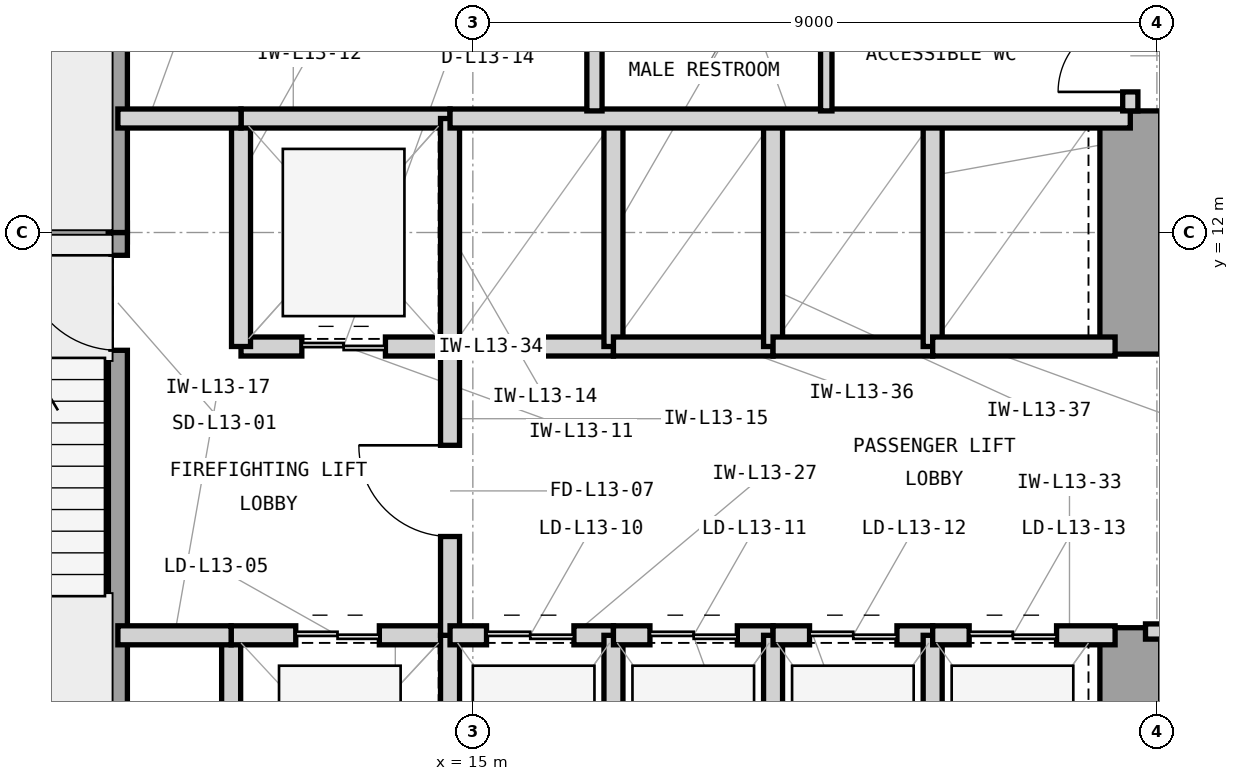
"""IFC4 building model, lengths in metres.
Left out: names, types, materials, properties, quantities, classifications, styles, units other than length and angle.
Written with IfcOpenShell. Run it as: python <this file> out.ifc"""

import sys

from ifc_helpers import new_model, si_unit, direction, frame, frame_2d, origin, place, context, subcontext, project, spatial, rectangle, extrude, element, fill, save


model = new_model("IFC4")
c1 = context("Model", 3, precision=1e-05, world=origin(), true_north=direction((0.0, 1.0)))
c2 = subcontext(c1, "Body", "Model", "MODEL_VIEW")
j1 = project(units=[si_unit("LENGTHUNIT", "METRE"), si_unit("PLANEANGLEUNIT", "RADIAN")], contexts=[c1])
p1 = place(None, origin())
s1 = spatial("IfcSite", under=j1, at=p1, CompositionType="ELEMENT")
p2 = place(p1, origin())
s2 = spatial("IfcBuilding", under=s1, at=p2, CompositionType="ELEMENT")
p3 = place(p2, frame((0.0, 0.0, 59.4)))
s3 = spatial("IfcBuildingStorey", under=s2, at=p3, CompositionType="ELEMENT", Elevation=59.4)
p4 = place(p3, frame((23.65, 3.75, 0.0), z_axis=(0.0, 0.0, 1.0), x_axis=(0.0, 1.0, 0.0)))
e1 = element("IfcWall", 1, at=p4, inside=s3, PredefinedType="SHEAR", context=c2, shape_type="SweptSolid", body=[
    extrude(rectangle(XDim=3.05, YDim=0.8, at=frame_2d((1.525, 0.0))), origin(), (0.0, 0.0, 1.0), 4.2),
])
p5 = place(p3, frame((23.65, 10.4, 0.0), z_axis=(0.0, 0.0, 1.0), x_axis=(0.0, 1.0, 0.0)))
e2 = element("IfcWall", 2, at=p5, inside=s3, PredefinedType="SHEAR", context=c2, shape_type="SweptSolid", body=[
    extrude(rectangle(XDim=3.2, YDim=0.8, at=frame_2d((1.6, 0.0))), origin(), (0.0, 0.0, 1.0), 4.2),
])
p6 = place(p3, frame((6.35, 12.0, 0.0), z_axis=(0.0, 0.0, 1.0), x_axis=(1.0, 0.0, 0.0)))
e3 = element("IfcWall", 3, at=p6, inside=s3, PredefinedType="SHEAR", context=c2, shape_type="SweptSolid", body=[
    extrude(rectangle(XDim=4.105, YDim=0.25, at=frame_2d((2.052, 0.0))), origin(), (0.0, 0.0, 1.0), 4.2),
])
p7 = place(p3, frame((10.33, 4.55, 0.0), z_axis=(0.0, 0.0, 1.0), x_axis=(0.0, 1.0, 0.0)))
e4 = element("IfcWall", 4, at=p7, inside=s3, PredefinedType="SHEAR", context=c2, shape_type="SweptSolid", body=[
    extrude(rectangle(XDim=7.45, YDim=0.25, at=frame_2d((3.725, 0.0))), origin(), (0.0, 0.0, 1.0), 4.2),
])
p8 = place(p7, frame((5.9, 0.0, 0.0)))
e5 = element("IfcOpeningElement", 5, at=p8, cuts=e4, PredefinedType="OPENING", context=c2, shape_type="SweptSolid", body=[
    extrude(rectangle(XDim=1.25, YDim=2.2, at=frame_2d((0.625, 1.1))), frame((0.0, 0.135, 0.0), z_axis=(0.0, -1.0, 0.0), x_axis=(1.0, 0.0, 0.0)), (0.0, 0.0, 1.0), 0.27),
])
p9 = place(p3, frame((10.33, 12.0, 0.0), z_axis=(0.0, 0.0, 1.0), x_axis=(0.0, 1.0, 0.0)))
e6 = element("IfcWall", 6, at=p9, inside=s3, PredefinedType="SHEAR", context=c2, shape_type="SweptSolid", body=[
    extrude(rectangle(XDim=7.45, YDim=0.25, at=frame_2d((3.725, 0.0))), origin(), (0.0, 0.0, 1.0), 4.2),
])
p10 = place(p9, frame((5.85, 0.0, 0.0)))
e7 = element("IfcOpeningElement", 7, at=p10, cuts=e6, PredefinedType="OPENING", context=c2, shape_type="SweptSolid", body=[
    extrude(rectangle(XDim=1.25, YDim=2.2, at=frame_2d((0.625, 1.1))), frame((0.0, 0.135, 0.0), z_axis=(0.0, -1.0, 0.0), x_axis=(1.0, 0.0, 0.0)), (0.0, 0.0, 1.0), 0.27),
])
p11 = place(p3, frame((11.82, 3.35, 0.0), z_axis=(0.0, 0.0, 1.0), x_axis=(0.0, 1.0, 0.0)))
e8 = element("IfcWall", 8, at=p11, inside=s3, PredefinedType="PARTITIONING", context=c2, shape_type="SweptSolid", body=[
    extrude(rectangle(XDim=3.35, YDim=0.25, at=frame_2d((1.675, 0.0))), origin(), (0.0, 0.0, 1.0), 3.97),
])
p12 = place(p3, frame((11.82, 6.7, 0.0), z_axis=(0.0, 0.0, 1.0), x_axis=(1.0, 0.0, 0.0)))
e9 = element("IfcWall", 9, at=p12, inside=s3, PredefinedType="PARTITIONING", context=c2, shape_type="SweptSolid", body=[
    extrude(rectangle(XDim=2.88, YDim=0.25, at=frame_2d((1.44, 0.0))), origin(), (0.0, 0.0, 1.0), 3.426),
])
p13 = place(p12, frame((0.85, 0.0, 0.0)))
e10 = element("IfcOpeningElement", 10, at=p13, cuts=e9, PredefinedType="OPENING", context=c2, shape_type="SweptSolid", body=[
    extrude(rectangle(XDim=1.1, YDim=2.25, at=frame_2d((0.55, 1.125))), frame((0.0, 0.135, 0.0), z_axis=(0.0, -1.0, 0.0), x_axis=(1.0, 0.0, 0.0)), (0.0, 0.0, 1.0), 0.27),
])
p14 = place(p3, frame((14.7, 3.35, 0.0), z_axis=(0.0, 0.0, 1.0), x_axis=(0.0, 1.0, 0.0)))
e11 = element("IfcWall", 11, at=p14, inside=s3, PredefinedType="PARTITIONING", context=c2, shape_type="SweptSolid", body=[
    extrude(rectangle(XDim=3.35, YDim=0.25, at=frame_2d((1.675, 0.0))), origin(), (0.0, 0.0, 1.0), 3.97),
])
p15 = place(p3, frame((11.95, 10.5, 0.0), z_axis=(0.0, 0.0, 1.0), x_axis=(1.0, 0.0, 0.0)))
e12 = element("IfcWall", 12, at=p15, inside=s3, PredefinedType="PARTITIONING", context=c2, shape_type="SweptSolid", body=[
    extrude(rectangle(XDim=2.75, YDim=0.25, at=frame_2d((1.375, 0.0))), origin(), (0.0, 0.0, 1.0), 3.426),
])
p16 = place(p15, frame((0.8, 0.0, 0.0)))
e13 = element("IfcOpeningElement", 13, at=p16, cuts=e12, PredefinedType="OPENING", context=c2, shape_type="SweptSolid", body=[
    extrude(rectangle(XDim=1.1, YDim=2.25, at=frame_2d((0.55, 1.125))), frame((0.0, 0.135, 0.0), z_axis=(0.0, -1.0, 0.0), x_axis=(1.0, 0.0, 0.0)), (0.0, 0.0, 1.0), 0.27),
])
p17 = place(p3, frame((11.95, 10.5, 0.0), z_axis=(0.0, 0.0, 1.0), x_axis=(0.0, 1.0, 0.0)))
e14 = element("IfcWall", 14, at=p17, inside=s3, PredefinedType="PARTITIONING", context=c2, shape_type="SweptSolid", body=[
    extrude(rectangle(XDim=3.0, YDim=0.25, at=frame_2d((1.5, 0.0))), origin(), (0.0, 0.0, 1.0), 3.97),
])
p18 = place(p3, frame((11.95, 13.5, 0.0), z_axis=(0.0, 0.0, 1.0), x_axis=(1.0, 0.0, 0.0)))
e15 = element("IfcWall", 15, at=p18, inside=s3, PredefinedType="PARTITIONING", context=c2, shape_type="SweptSolid", body=[
    extrude(rectangle(XDim=2.75, YDim=0.25, at=frame_2d((1.375, 0.0))), origin(), (0.0, 0.0, 1.0), 3.426),
])
p19 = place(p3, frame((14.7, 10.5, 0.0), z_axis=(0.0, 0.0, 1.0), x_axis=(0.0, 1.0, 0.0)))
e16 = element("IfcWall", 16, at=p19, inside=s3, PredefinedType="PARTITIONING", context=c2, shape_type="SweptSolid", body=[
    extrude(rectangle(XDim=3.0, YDim=0.25, at=frame_2d((1.5, 0.0))), origin(), (0.0, 0.0, 1.0), 3.97),
])
p20 = place(p3, frame((14.7, 6.7, 0.0), z_axis=(0.0, 0.0, 1.0), x_axis=(0.0, 1.0, 0.0)))
e17 = element("IfcWall", 17, at=p20, inside=s3, PredefinedType="PARTITIONING", context=c2, shape_type="SweptSolid", body=[
    extrude(rectangle(XDim=3.8, YDim=0.25, at=frame_2d((1.9, 0.0))), origin(), (0.0, 0.0, 1.0), 3.97),
])
p21 = place(p20, frame((1.3, 0.0, 0.0)))
e18 = element("IfcOpeningElement", 18, at=p21, cuts=e17, PredefinedType="OPENING", context=c2, shape_type="SweptSolid", body=[
    extrude(rectangle(XDim=1.2, YDim=2.2, at=frame_2d((0.6, 1.1))), frame((0.0, 0.135, 0.0), z_axis=(0.0, -1.0, 0.0), x_axis=(1.0, 0.0, 0.0)), (0.0, 0.0, 1.0), 0.27),
])
p22 = place(p3, frame((10.33, 13.5, 0.0), z_axis=(0.0, 0.0, 1.0), x_axis=(1.0, 0.0, 0.0)))
e19 = element("IfcWall", 19, at=p22, inside=s3, PredefinedType="PARTITIONING", context=c2, shape_type="SweptSolid", body=[
    extrude(rectangle(XDim=1.62, YDim=0.25, at=frame_2d((0.81, 0.0))), origin(), (0.0, 0.0, 1.0), 3.426),
])
p23 = place(p3, frame((10.33, 6.7, 0.0), z_axis=(0.0, 0.0, 1.0), x_axis=(1.0, 0.0, 0.0)))
e20 = element("IfcWall", 20, at=p23, inside=s3, PredefinedType="PARTITIONING", context=c2, shape_type="SweptSolid", body=[
    extrude(rectangle(XDim=1.49, YDim=0.25, at=frame_2d((0.745, 0.0))), origin(), (0.0, 0.0, 1.0), 3.426),
])
p24 = place(p3, frame((14.7, 6.7, 0.0), z_axis=(0.0, 0.0, 1.0), x_axis=(1.0, 0.0, 0.0)))
e21 = element("IfcWall", 21, at=p24, inside=s3, PredefinedType="PARTITIONING", context=c2, shape_type="SweptSolid", body=[
    extrude(rectangle(XDim=2.15, YDim=0.25, at=frame_2d((1.075, 0.0))), origin(), (0.0, 0.0, 1.0), 3.426),
])
p25 = place(p24, frame((0.48, 0.0, 0.0)))
e22 = element("IfcOpeningElement", 22, at=p25, cuts=e21, PredefinedType="OPENING", context=c2, shape_type="SweptSolid", body=[
    extrude(rectangle(XDim=1.15, YDim=2.25, at=frame_2d((0.575, 1.125))), frame((0.0, 0.135, 0.0), z_axis=(0.0, -1.0, 0.0), x_axis=(1.0, 0.0, 0.0)), (0.0, 0.0, 1.0), 0.27),
])
p26 = place(p3, frame((16.85, 3.35, 0.0), z_axis=(0.0, 0.0, 1.0), x_axis=(0.0, 1.0, 0.0)))
e23 = element("IfcWall", 23, at=p26, inside=s3, PredefinedType="PARTITIONING", context=c2, shape_type="SweptSolid", body=[
    extrude(rectangle(XDim=3.35, YDim=0.25, at=frame_2d((1.675, 0.0))), origin(), (0.0, 0.0, 1.0), 3.97),
])
p27 = place(p3, frame((16.85, 6.7, 0.0), z_axis=(0.0, 0.0, 1.0), x_axis=(1.0, 0.0, 0.0)))
e24 = element("IfcWall", 24, at=p27, inside=s3, PredefinedType="PARTITIONING", context=c2, shape_type="SweptSolid", body=[
    extrude(rectangle(XDim=2.1, YDim=0.25, at=frame_2d((1.05, 0.0))), origin(), (0.0, 0.0, 1.0), 3.426),
])
p28 = place(p27, frame((0.48, 0.0, 0.0)))
e25 = element("IfcOpeningElement", 25, at=p28, cuts=e24, PredefinedType="OPENING", context=c2, shape_type="SweptSolid", body=[
    extrude(rectangle(XDim=1.15, YDim=2.25, at=frame_2d((0.575, 1.125))), frame((0.0, 0.135, 0.0), z_axis=(0.0, -1.0, 0.0), x_axis=(1.0, 0.0, 0.0)), (0.0, 0.0, 1.0), 0.27),
])
p29 = place(p3, frame((18.95, 3.35, 0.0), z_axis=(0.0, 0.0, 1.0), x_axis=(0.0, 1.0, 0.0)))
e26 = element("IfcWall", 26, at=p29, inside=s3, PredefinedType="PARTITIONING", context=c2, shape_type="SweptSolid", body=[
    extrude(rectangle(XDim=3.35, YDim=0.25, at=frame_2d((1.675, 0.0))), origin(), (0.0, 0.0, 1.0), 3.97),
])
p30 = place(p3, frame((18.95, 6.7, 0.0), z_axis=(0.0, 0.0, 1.0), x_axis=(1.0, 0.0, 0.0)))
e27 = element("IfcWall", 27, at=p30, inside=s3, PredefinedType="PARTITIONING", context=c2, shape_type="SweptSolid", body=[
    extrude(rectangle(XDim=2.1, YDim=0.25, at=frame_2d((1.05, 0.0))), origin(), (0.0, 0.0, 1.0), 3.426),
])
p31 = place(p30, frame((0.48, 0.0, 0.0)))
e28 = element("IfcOpeningElement", 28, at=p31, cuts=e27, PredefinedType="OPENING", context=c2, shape_type="SweptSolid", body=[
    extrude(rectangle(XDim=1.15, YDim=2.25, at=frame_2d((0.575, 1.125))), frame((0.0, 0.135, 0.0), z_axis=(0.0, -1.0, 0.0), x_axis=(1.0, 0.0, 0.0)), (0.0, 0.0, 1.0), 0.27),
])
p32 = place(p3, frame((21.05, 3.35, 0.0), z_axis=(0.0, 0.0, 1.0), x_axis=(0.0, 1.0, 0.0)))
e29 = element("IfcWall", 29, at=p32, inside=s3, PredefinedType="PARTITIONING", context=c2, shape_type="SweptSolid", body=[
    extrude(rectangle(XDim=3.35, YDim=0.25, at=frame_2d((1.675, 0.0))), origin(), (0.0, 0.0, 1.0), 3.97),
])
p33 = place(p3, frame((21.05, 6.7, 0.0), z_axis=(0.0, 0.0, 1.0), x_axis=(1.0, 0.0, 0.0)))
e30 = element("IfcWall", 30, at=p33, inside=s3, PredefinedType="PARTITIONING", context=c2, shape_type="SweptSolid", body=[
    extrude(rectangle(XDim=2.4, YDim=0.25, at=frame_2d((1.2, 0.0))), origin(), (0.0, 0.0, 1.0), 3.426),
])
p34 = place(p33, frame((0.48, 0.0, 0.0)))
e31 = element("IfcOpeningElement", 31, at=p34, cuts=e30, PredefinedType="OPENING", context=c2, shape_type="SweptSolid", body=[
    extrude(rectangle(XDim=1.15, YDim=2.25, at=frame_2d((0.575, 1.125))), frame((0.0, 0.135, 0.0), z_axis=(0.0, -1.0, 0.0), x_axis=(1.0, 0.0, 0.0)), (0.0, 0.0, 1.0), 0.27),
])
p35 = place(p3, frame((14.7, 10.5, 0.0), z_axis=(0.0, 0.0, 1.0), x_axis=(1.0, 0.0, 0.0)))
e32 = element("IfcWall", 32, at=p35, inside=s3, PredefinedType="PARTITIONING", context=c2, shape_type="SweptSolid", body=[
    extrude(rectangle(XDim=2.15, YDim=0.25, at=frame_2d((1.075, 0.0))), origin(), (0.0, 0.0, 1.0), 3.426),
])
p36 = place(p3, frame((16.85, 10.5, 0.0), z_axis=(0.0, 0.0, 1.0), x_axis=(0.0, 1.0, 0.0)))
e33 = element("IfcWall", 33, at=p36, inside=s3, PredefinedType="PARTITIONING", context=c2, shape_type="SweptSolid", body=[
    extrude(rectangle(XDim=3.0, YDim=0.25, at=frame_2d((1.5, 0.0))), origin(), (0.0, 0.0, 1.0), 3.97),
])
p37 = place(p3, frame((16.85, 10.5, 0.0), z_axis=(0.0, 0.0, 1.0), x_axis=(1.0, 0.0, 0.0)))
e34 = element("IfcWall", 34, at=p37, inside=s3, PredefinedType="PARTITIONING", context=c2, shape_type="SweptSolid", body=[
    extrude(rectangle(XDim=2.1, YDim=0.25, at=frame_2d((1.05, 0.0))), origin(), (0.0, 0.0, 1.0), 3.426),
])
p38 = place(p3, frame((18.95, 10.5, 0.0), z_axis=(0.0, 0.0, 1.0), x_axis=(0.0, 1.0, 0.0)))
e35 = element("IfcWall", 35, at=p38, inside=s3, PredefinedType="PARTITIONING", context=c2, shape_type="SweptSolid", body=[
    extrude(rectangle(XDim=3.0, YDim=0.25, at=frame_2d((1.5, 0.0))), origin(), (0.0, 0.0, 1.0), 3.97),
])
p39 = place(p3, frame((18.95, 10.5, 0.0), z_axis=(0.0, 0.0, 1.0), x_axis=(1.0, 0.0, 0.0)))
e36 = element("IfcWall", 36, at=p39, inside=s3, PredefinedType="PARTITIONING", context=c2, shape_type="SweptSolid", body=[
    extrude(rectangle(XDim=2.1, YDim=0.25, at=frame_2d((1.05, 0.0))), origin(), (0.0, 0.0, 1.0), 3.426),
])
p40 = place(p3, frame((21.05, 10.5, 0.0), z_axis=(0.0, 0.0, 1.0), x_axis=(0.0, 1.0, 0.0)))
e37 = element("IfcWall", 37, at=p40, inside=s3, PredefinedType="PARTITIONING", context=c2, shape_type="SweptSolid", body=[
    extrude(rectangle(XDim=3.0, YDim=0.25, at=frame_2d((1.5, 0.0))), origin(), (0.0, 0.0, 1.0), 3.97),
])
p41 = place(p3, frame((21.05, 10.5, 0.0), z_axis=(0.0, 0.0, 1.0), x_axis=(1.0, 0.0, 0.0)))
e38 = element("IfcWall", 38, at=p41, inside=s3, PredefinedType="PARTITIONING", context=c2, shape_type="SweptSolid", body=[
    extrude(rectangle(XDim=2.4, YDim=0.25, at=frame_2d((1.2, 0.0))), origin(), (0.0, 0.0, 1.0), 3.426),
])
p42 = place(p3, frame((14.7, 13.5, 0.0), z_axis=(0.0, 0.0, 1.0), x_axis=(1.0, 0.0, 0.0)))
e39 = element("IfcWall", 39, at=p42, inside=s3, PredefinedType="PARTITIONING", context=c2, shape_type="SweptSolid", body=[
    extrude(rectangle(XDim=8.95, YDim=0.25, at=frame_2d((4.475, 0.0))), origin(), (0.0, 0.0, 1.0), 3.426),
])
p43 = place(p3, frame((16.6, 13.6, 0.0), z_axis=(0.0, 0.0, 1.0), x_axis=(0.0, 1.0, 0.0)))
e40 = element("IfcWall", 40, at=p43, inside=s3, PredefinedType="PARTITIONING", context=c2, shape_type="SweptSolid", body=[
    extrude(rectangle(XDim=3.0, YDim=0.2, at=frame_2d((1.5, 0.0))), origin(), (0.0, 0.0, 1.0), 3.97),
])
p44 = place(p43, frame((1.02, 0.0, 0.0)))
e41 = element("IfcOpeningElement", 41, at=p44, cuts=e40, PredefinedType="OPENING", context=c2, shape_type="SweptSolid", body=[
    extrude(rectangle(XDim=0.95, YDim=2.1, at=frame_2d((0.475, 1.05))), frame((0.0, 0.11, 0.0), z_axis=(0.0, -1.0, 0.0), x_axis=(1.0, 0.0, 0.0)), (0.0, 0.0, 1.0), 0.22),
])
p45 = place(p3, frame((19.65, 13.6, 0.0), z_axis=(0.0, 0.0, 1.0), x_axis=(0.0, 1.0, 0.0)))
e42 = element("IfcWall", 42, at=p45, inside=s3, PredefinedType="PARTITIONING", context=c2, shape_type="SweptSolid", body=[
    extrude(rectangle(XDim=3.0, YDim=0.15, at=frame_2d((1.5, 0.0))), origin(), (0.0, 0.0, 1.0), 3.97),
])
p46 = place(p3, frame((23.65, 13.6, 0.0), z_axis=(0.0, 0.0, 1.0), x_axis=(0.0, 1.0, 0.0)))
e43 = element("IfcWall", 43, at=p46, inside=s3, PredefinedType="PARTITIONING", context=c2, shape_type="SweptSolid", body=[
    extrude(rectangle(XDim=3.0, YDim=0.2, at=frame_2d((1.5, 0.0))), origin(), (0.0, 0.0, 1.0), 3.97),
])
p47 = place(p46, frame((0.25, 0.0, 0.0)))
e44 = element("IfcOpeningElement", 44, at=p47, cuts=e43, PredefinedType="OPENING", context=c2, shape_type="SweptSolid", body=[
    extrude(rectangle(XDim=0.95, YDim=2.1, at=frame_2d((0.475, 1.05))), frame((0.0, 0.11, 0.0), z_axis=(0.0, -1.0, 0.0), x_axis=(1.0, 0.0, 0.0)), (0.0, 0.0, 1.0), 0.22),
])
p48 = place(p46, frame((1.8, 0.0, 0.0)))
e45 = element("IfcOpeningElement", 45, at=p48, cuts=e43, PredefinedType="OPENING", context=c2, shape_type="SweptSolid", body=[
    extrude(rectangle(XDim=0.95, YDim=2.1, at=frame_2d((0.475, 1.05))), frame((0.0, 0.11, 0.0), z_axis=(0.0, -1.0, 0.0), x_axis=(1.0, 0.0, 0.0)), (0.0, 0.0, 1.0), 0.22),
])
p49 = place(p3, frame((23.85, 6.75, 0.0), z_axis=(0.0, 0.0, 1.0), x_axis=(1.0, 0.0, 0.0)))
e46 = element("IfcWall", 46, at=p49, inside=s3, PredefinedType="PARTITIONING", context=c2, shape_type="SweptSolid", body=[
    extrude(rectangle(XDim=2.85, YDim=0.2, at=frame_2d((1.425, 0.0))), origin(), (0.0, 0.0, 1.0), 3.97),
])
p50 = place(p49, frame((0.7, 0.0, 0.0)))
e47 = element("IfcOpeningElement", 47, at=p50, cuts=e46, PredefinedType="OPENING", context=c2, shape_type="SweptSolid", body=[
    extrude(rectangle(XDim=1.0, YDim=2.15, at=frame_2d((0.5, 1.075))), frame((0.0, 0.11, 0.0), z_axis=(0.0, -1.0, 0.0), x_axis=(1.0, 0.0, 0.0)), (0.0, 0.0, 1.0), 0.22),
])
p51 = place(p8, origin())
e48 = element("IfcDoor", 48, at=p51, inside=s3, OperationType="SINGLE_SWING_RIGHT", PredefinedType="DOOR", context=c2, shape_type="SweptSolid", body=[
    extrude(rectangle(XDim=1.25, YDim=2.2, at=frame_2d((0.625, 1.1))), frame((0.0, 0.025, 0.0), z_axis=(0.0, -1.0, 0.0), x_axis=(1.0, 0.0, 0.0)), (0.0, 0.0, 1.0), 0.05),
])
fill(e5, e48)
p52 = place(p13, origin())
e49 = element("IfcDoor", 49, at=p52, inside=s3, OperationType="DOUBLE_DOOR_SLIDING", PredefinedType="DOOR", context=c2, shape_type="SweptSolid", body=[
    extrude(rectangle(XDim=1.1, YDim=2.25, at=frame_2d((0.55, 1.125))), frame((0.0, 0.025, 0.0), z_axis=(0.0, -1.0, 0.0), x_axis=(1.0, 0.0, 0.0)), (0.0, 0.0, 1.0), 0.05),
])
fill(e10, e49)
p53 = place(p16, origin())
e50 = element("IfcDoor", 50, at=p53, inside=s3, OperationType="DOUBLE_DOOR_SLIDING", PredefinedType="DOOR", context=c2, shape_type="SweptSolid", body=[
    extrude(rectangle(XDim=1.1, YDim=2.25, at=frame_2d((0.55, 1.125))), frame((0.0, 0.025, 0.0), z_axis=(0.0, -1.0, 0.0), x_axis=(1.0, 0.0, 0.0)), (0.0, 0.0, 1.0), 0.05),
])
fill(e13, e50)
p54 = place(p21, origin())
e51 = element("IfcDoor", 51, at=p54, inside=s3, OperationType="SINGLE_SWING_RIGHT", PredefinedType="DOOR", context=c2, shape_type="SweptSolid", body=[
    extrude(rectangle(XDim=1.2, YDim=2.2, at=frame_2d((0.6, 1.1))), frame((0.0, 0.025, 0.0), z_axis=(0.0, -1.0, 0.0), x_axis=(1.0, 0.0, 0.0)), (0.0, 0.0, 1.0), 0.05),
])
fill(e18, e51)
p55 = place(p25, origin())
e52 = element("IfcDoor", 52, at=p55, inside=s3, OperationType="DOUBLE_DOOR_SLIDING", PredefinedType="DOOR", context=c2, shape_type="SweptSolid", body=[
    extrude(rectangle(XDim=1.15, YDim=2.25, at=frame_2d((0.575, 1.125))), frame((0.0, 0.025, 0.0), z_axis=(0.0, -1.0, 0.0), x_axis=(1.0, 0.0, 0.0)), (0.0, 0.0, 1.0), 0.05),
])
fill(e22, e52)
p56 = place(p28, origin())
e53 = element("IfcDoor", 53, at=p56, inside=s3, OperationType="DOUBLE_DOOR_SLIDING", PredefinedType="DOOR", context=c2, shape_type="SweptSolid", body=[
    extrude(rectangle(XDim=1.15, YDim=2.25, at=frame_2d((0.575, 1.125))), frame((0.0, 0.025, 0.0), z_axis=(0.0, -1.0, 0.0), x_axis=(1.0, 0.0, 0.0)), (0.0, 0.0, 1.0), 0.05),
])
fill(e25, e53)
p57 = place(p31, origin())
e54 = element("IfcDoor", 54, at=p57, inside=s3, OperationType="DOUBLE_DOOR_SLIDING", PredefinedType="DOOR", context=c2, shape_type="SweptSolid", body=[
    extrude(rectangle(XDim=1.15, YDim=2.25, at=frame_2d((0.575, 1.125))), frame((0.0, 0.025, 0.0), z_axis=(0.0, -1.0, 0.0), x_axis=(1.0, 0.0, 0.0)), (0.0, 0.0, 1.0), 0.05),
])
fill(e28, e54)
p58 = place(p34, origin())
e55 = element("IfcDoor", 55, at=p58, inside=s3, OperationType="DOUBLE_DOOR_SLIDING", PredefinedType="DOOR", context=c2, shape_type="SweptSolid", body=[
    extrude(rectangle(XDim=1.15, YDim=2.25, at=frame_2d((0.575, 1.125))), frame((0.0, 0.025, 0.0), z_axis=(0.0, -1.0, 0.0), x_axis=(1.0, 0.0, 0.0)), (0.0, 0.0, 1.0), 0.05),
])
fill(e31, e55)
p59 = place(p47, origin())
e56 = element("IfcDoor", 56, at=p59, inside=s3, OperationType="SINGLE_SWING_LEFT", PredefinedType="DOOR", context=c2, shape_type="SweptSolid", body=[
    extrude(rectangle(XDim=0.95, YDim=2.1, at=frame_2d((0.475, 1.05))), frame((0.0, 0.025, 0.0), z_axis=(0.0, -1.0, 0.0), x_axis=(1.0, 0.0, 0.0)), (0.0, 0.0, 1.0), 0.05),
])
fill(e44, e56)
save(model, sys.argv[1])
